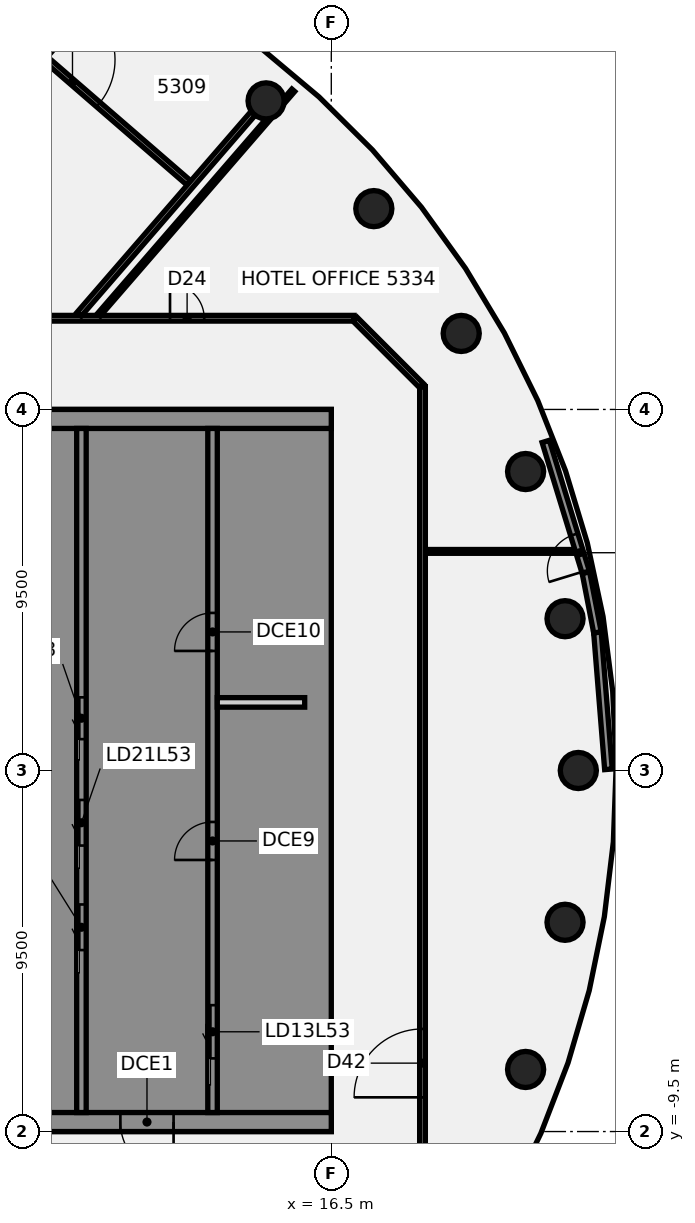
"""IFC4 building model, lengths in metres.
Left out: names, types, materials, properties, quantities, classifications, styles, units other than length and angle.
Written with IfcOpenShell. Run it as: python <this file> out.ifc"""

import sys

from ifc_helpers import new_model, si_unit, direction, frame, frame_2d, origin, origin_2d, place, context, subcontext, project, spatial, polyline, rectangle, circle, outline, extrude, element, fill, save


model = new_model("IFC4")
c1 = context("Model", 3, precision=1e-05, world=origin(), true_north=direction((0.0, 1.0)))
c2 = subcontext(c1, "Body", "Model", "MODEL_VIEW")
j1 = project(units=[si_unit("LENGTHUNIT", "METRE"), si_unit("PLANEANGLEUNIT", "RADIAN")], contexts=[c1])
p1 = place(None, origin())
s1 = spatial("IfcSite", under=j1, at=p1, CompositionType="ELEMENT")
p2 = place(p1, origin())
s2 = spatial("IfcBuilding", under=s1, at=p2, CompositionType="ELEMENT")
p3 = place(p2, frame((0.0, 0.0, 211.3)))
s3 = spatial("IfcBuildingStorey", under=s2, at=p3, CompositionType="ELEMENT", Elevation=211.3)
for number, where, z_axis, x_axis in (
    (1, (23.0, 0.0, -0.14), (0.0, 0.0, 1.0), (1.0, 0.0, 0.0)),
    (2, (22.651, 3.994, -0.14), (0.0, 0.0, 1.0), (1.0, 0.0, 0.0)),
    (3, (21.613, 7.866, -0.14), (0.0, 0.0, 1.0), (1.0, 0.0, 0.0)),
    (4, (19.919, 11.5, -0.14), (0.0, 0.0, 1.0), (1.0, 0.0, 0.0)),
    (5, (17.619, 14.784, -0.14), (0.0, 0.0, 1.0), (1.0, 0.0, 0.0)),
    (6, (14.784, 17.619, -0.14), (0.0, 0.0, 1.0), (1.0, 0.0, 0.0)),
    (7, (21.613, -7.866, -0.14), (0.0, 0.0, 1.0), (1.0, 0.0, 0.0)),
    (8, (22.651, -3.994, -0.14), (0.0, 0.0, 1.0), (1.0, 0.0, 0.0)),
):
    element("IfcColumn", number, at=place(p3, frame(where, z_axis=z_axis, x_axis=x_axis)), inside=s3, PredefinedType="COLUMN", context=c2, shape_type="SweptSolid", body=[
        extrude(circle(Radius=0.475, at=origin_2d()), origin(), (0.0, 0.0, 1.0), 3.56),
    ])
p4 = place(p3, frame((17.128, 11.872, 0.0), z_axis=(0.0, 0.0, 1.0), x_axis=(0.707106781187, -0.707106781187, 0.0)))
e9 = element("IfcWall", 9, at=p4, inside=s3, PredefinedType="PARTITIONING", context=c2, shape_type="SweptSolid", body=[
    extrude(rectangle(XDim=2.465, YDim=0.15, at=frame_2d((1.232, 0.0))), origin(), (0.0, 0.0, 1.0), 2.824),
])
p5 = place(p3, frame((4.362, 22.723, 0.0), z_axis=(0.0, 0.0, 1.0), x_axis=(0.756102728105, -0.654452950603, 0.0)))
e10 = element("IfcWall", 10, at=p5, inside=s3, PredefinedType="PARTITIONING", context=c2, shape_type="SweptSolid", body=[
    extrude(rectangle(XDim=11.096, YDim=0.15, at=frame_2d((5.548, 0.0))), origin(), (0.0, 0.0, 1.0), 2.824),
])
p6 = place(p5, frame((6.147, 0.0, 0.0)))
e11 = element("IfcOpeningElement", 11, at=p6, cuts=e10, PredefinedType="OPENING", context=c2, shape_type="SweptSolid", body=[
    extrude(rectangle(XDim=1.8, YDim=2.1, at=frame_2d((0.9, 1.05))), frame((0.0, 0.085, 0.0), z_axis=(0.0, -1.0, 0.0), x_axis=(1.0, 0.0, 0.0)), (0.0, 0.0, 1.0), 0.17),
])
p7 = place(p3, frame((-17.065, 11.9, 0.0), z_axis=(0.0, 0.0, 1.0), x_axis=(1.0, 0.0, 0.0)))
e12 = element("IfcWall", 12, at=p7, inside=s3, PredefinedType="PARTITIONING", context=c2, shape_type="SweptSolid", body=[
    extrude(rectangle(XDim=34.165, YDim=0.15, at=frame_2d((17.083, 0.0))), origin(), (0.0, 0.0, 1.0), 2.824),
])
p8 = place(p7, frame((24.284, 0.0, 0.0)))
e13 = element("IfcOpeningElement", 13, at=p8, cuts=e12, PredefinedType="OPENING", context=c2, shape_type="SweptSolid", body=[
    extrude(rectangle(XDim=1.8, YDim=2.1, at=frame_2d((0.9, 1.05))), frame((0.0, 0.085, 0.0), z_axis=(0.0, -1.0, 0.0), x_axis=(1.0, 0.0, 0.0)), (0.0, 0.0, 1.0), 0.17),
])
p9 = place(p7, frame((9.009, 0.0, 0.0)))
e14 = element("IfcOpeningElement", 14, at=p9, cuts=e12, PredefinedType="OPENING", context=c2, shape_type="SweptSolid", body=[
    extrude(rectangle(XDim=1.8, YDim=2.1, at=frame_2d((0.9, 1.05))), frame((0.0, 0.085, 0.0), z_axis=(0.0, -1.0, 0.0), x_axis=(1.0, 0.0, 0.0)), (0.0, 0.0, 1.0), 0.17),
])
p10 = place(p7, frame((29.321, 0.0, 0.0)))
e15 = element("IfcOpeningElement", 15, at=p10, cuts=e12, PredefinedType="OPENING", context=c2, shape_type="SweptSolid", body=[
    extrude(rectangle(XDim=0.9, YDim=2.1, at=frame_2d((0.45, 1.05))), frame((0.0, 0.085, 0.0), z_axis=(0.0, -1.0, 0.0), x_axis=(1.0, 0.0, 0.0)), (0.0, 0.0, 1.0), 0.17),
])
p11 = place(p7, frame((2.859, 0.0, 0.0)))
e16 = element("IfcOpeningElement", 16, at=p11, cuts=e12, PredefinedType="OPENING", context=c2, shape_type="SweptSolid", body=[
    extrude(rectangle(XDim=1.8, YDim=2.1, at=frame_2d((0.9, 1.05))), frame((0.0, 0.085, 0.0), z_axis=(0.0, -1.0, 0.0), x_axis=(1.0, 0.0, 0.0)), (0.0, 0.0, 1.0), 0.17),
])
p12 = place(p3, frame((18.955, 5.765, 0.0), z_axis=(0.0, 0.0, 1.0), x_axis=(1.0, 0.0, 0.0)))
e17 = element("IfcWall", 17, at=p12, inside=s3, PredefinedType="PARTITIONING", context=c2, shape_type="SweptSolid", body=[
    extrude(rectangle(XDim=4.022, YDim=0.1, at=frame_2d((2.011, 0.0))), origin(), (0.0, 0.0, 1.0), 2.824),
])
p13 = place(p3, frame((10.385, 11.991, 0.0), z_axis=(0.0, 0.0, 1.0), x_axis=(0.654631052214, 0.755948533617, 0.0)))
e18 = element("IfcWall", 18, at=p13, inside=s3, PredefinedType="PARTITIONING", context=c2, shape_type="SweptSolid", body=[
    extrude(rectangle(XDim=6.829, YDim=0.1, at=frame_2d((3.415, 0.0))), origin(), (0.0, 0.0, 1.0), 2.824),
])
p14 = place(p3, frame((15.267, 17.628, 0.0), z_axis=(0.0, 0.0, 1.0), x_axis=(0.655060689761, 0.75557626533, 0.0)))
e19 = element("IfcWall", 19, at=p14, inside=s3, PredefinedType="PARTITIONING", context=c2, shape_type="SweptSolid", body=[
    extrude(rectangle(XDim=0.357, YDim=0.1, at=frame_2d((0.178, 0.0))), origin(), (0.0, 0.0, 1.0), 2.824),
])
p15 = place(p3, frame((9.865, 12.006, 0.0), z_axis=(0.0, 0.0, 1.0), x_axis=(0.654719299236, 0.75587210506, 0.0)))
e20 = element("IfcWall", 20, at=p15, inside=s3, PredefinedType="PARTITIONING", context=c2, shape_type="SweptSolid", body=[
    extrude(rectangle(XDim=6.997, YDim=0.15, at=frame_2d((3.499, 0.0))), origin(), (0.0, 0.0, 1.0), 2.824),
])
p16 = place(p3, frame((18.9, -10.1, 0.0), z_axis=(0.0, 0.0, 1.0), x_axis=(0.0, 1.0, 0.0)))
e21 = element("IfcWall", 21, at=p16, inside=s3, PredefinedType="PARTITIONING", context=c2, shape_type="SweptSolid", body=[
    extrude(rectangle(XDim=20.2, YDim=0.15, at=frame_2d((10.1, 0.0))), origin(), (0.0, 0.0, 1.0), 2.824),
])
p17 = place(p16, frame((1.5, 0.0, 0.0)))
e22 = element("IfcOpeningElement", 22, at=p17, cuts=e21, PredefinedType="OPENING", context=c2, shape_type="SweptSolid", body=[
    extrude(rectangle(XDim=1.8, YDim=2.1, at=frame_2d((0.9, 1.05))), frame((0.0, 0.085, 0.0), z_axis=(0.0, -1.0, 0.0), x_axis=(1.0, 0.0, 0.0)), (0.0, 0.0, 1.0), 0.17),
])
p18 = place(p3, frame((23.793, 0.031, 0.0), z_axis=(0.0, 0.0, 1.0), x_axis=(-0.080027055539, 0.996792691778, 0.0)))
e23 = element("IfcWall", 23, at=p18, inside=s3, PredefinedType="SOLIDWALL", context=c2, shape_type="SweptSolid", body=[
    extrude(rectangle(XDim=3.615, YDim=0.2, at=frame_2d((1.808, 0.0))), origin(), (0.0, 0.0, 1.0), 3.42),
])
p19 = place(p3, frame((23.2, 5.204, 0.0), z_axis=(0.0, 0.0, 1.0), x_axis=(-0.292656271442, 0.956217708885, 0.0)))
e24 = element("IfcWall", 24, at=p19, inside=s3, PredefinedType="SOLIDWALL", context=c2, shape_type="SweptSolid", body=[
    extrude(rectangle(XDim=3.613, YDim=0.2, at=frame_2d((1.807, 0.0))), origin(), (0.0, 0.0, 1.0), 3.42),
])
p20 = place(p19, frame((0.05, 0.0, 0.0)))
e25 = element("IfcOpeningElement", 25, at=p20, cuts=e24, PredefinedType="OPENING", context=c2, shape_type="SweptSolid", body=[
    extrude(rectangle(XDim=1.0, YDim=2.4, at=frame_2d((0.5, 1.2))), frame((0.0, 0.11, 0.0), z_axis=(0.0, -1.0, 0.0), x_axis=(1.0, 0.0, 0.0)), (0.0, 0.0, 1.0), 0.22),
])
p21 = place(p3, frame((23.504, 3.634, 0.0), z_axis=(0.0, 0.0, 1.0), x_axis=(-0.189917473451, 0.981800057689, 0.0)))
e26 = element("IfcWall", 26, at=p21, inside=s3, PredefinedType="SOLIDWALL", context=c2, shape_type="SweptSolid", body=[
    extrude(rectangle(XDim=1.599, YDim=0.2, at=frame_2d((0.8, 0.0))), origin(), (0.0, 0.0, 1.0), 3.42),
])
p22 = place(p3, frame((16.5, -9.25, 0.0), z_axis=(0.0, 0.0, 1.0), x_axis=(-1.0, 0.0, 0.0)))
e27 = element("IfcWall", 27, at=p22, inside=s3, PredefinedType="SHEAR", context=c2, shape_type="SweptSolid", body=[
    extrude(rectangle(XDim=13.0, YDim=0.5, at=frame_2d((6.5, 0.0))), origin(), (0.0, 0.0, 1.0), 3.42),
])
p23 = place(p22, frame((4.15, 0.0, 0.0)))
e28 = element("IfcOpeningElement", 28, at=p23, cuts=e27, PredefinedType="OPENING", context=c2, shape_type="SweptSolid", body=[
    extrude(rectangle(XDim=1.4, YDim=2.1, at=frame_2d((0.7, 1.05))), frame((0.0, 0.26, 0.0), z_axis=(0.0, -1.0, 0.0), x_axis=(1.0, 0.0, 0.0)), (0.0, 0.0, 1.0), 0.52),
])
p24 = place(p22, frame((10.125, 0.0, 0.0)))
e29 = element("IfcOpeningElement", 29, at=p24, cuts=e27, PredefinedType="OPENING", context=c2, shape_type="SweptSolid", body=[
    extrude(rectangle(XDim=1.4, YDim=2.1, at=frame_2d((0.7, 1.05))), frame((0.0, 0.26, 0.0), z_axis=(0.0, -1.0, 0.0), x_axis=(1.0, 0.0, 0.0)), (0.0, 0.0, 1.0), 0.52),
])
p25 = place(p3, origin())
e30 = element("IfcWall", 30, at=p25, inside=s3, PredefinedType="SHEAR", context=c2, shape_type="SweptSolid", body=[
    extrude(outline(polyline([(13.5, -8.125), (13.5, -9.0), (16.0, -9.0), (16.5, -9.0), (16.5, 9.0), (16.0, 9.0), (13.5, 9.0), (13.5, 8.125), (16.0, 8.125), (16.0, 5.625), (13.5, 5.625), (13.5, 5.375), (16.0, 5.375), (16.0, -5.375), (13.5, -5.375), (13.5, -5.625), (16.0, -5.625), (16.0, -8.125), (13.5, -8.125)])), origin(), (0.0, 0.0, 1.0), 3.42),
])
p26 = place(p3, frame((16.5, 9.25, 0.0), z_axis=(0.0, 0.0, 1.0), x_axis=(-1.0, 0.0, 0.0)))
e31 = element("IfcWall", 31, at=p26, inside=s3, PredefinedType="SHEAR", context=c2, shape_type="SweptSolid", body=[
    extrude(rectangle(XDim=13.0, YDim=0.5, at=frame_2d((6.5, 0.0))), origin(), (0.0, 0.0, 1.0), 3.42),
])
p27 = place(p3, origin())
e32 = element("IfcWall", 32, at=p27, inside=s3, PredefinedType="SHEAR", context=c2, shape_type="SweptSolid", body=[
    extrude(outline(polyline([(9.8, -5.375), (7.5, -5.375), (7.5, -2.875), (9.8, -2.875), (9.8, -2.625), (7.5, -2.625), (7.5, -0.125), (9.8, -0.125), (9.8, 0.125), (7.5, 0.125), (7.5, 2.625), (9.8, 2.625), (9.8, 2.875), (7.5, 2.875), (7.5, 5.375), (9.8, 5.375), (9.8, 5.625), (7.5, 5.625), (7.5, 8.125), (9.8, 8.125), (9.8, 9.0), (7.5, 9.0), (7.25, 9.0), (7.25, -5.625), (7.5, -5.625), (9.8, -5.625), (9.8, -5.375)])), origin(), (0.0, 0.0, 1.0), 3.42),
])
p28 = place(p3, origin())
e33 = element("IfcWall", 33, at=p28, inside=s3, PredefinedType="SHEAR", context=c2, shape_type="SweptSolid", body=[
    extrude(outline(polyline([(7.5, -8.125), (7.5, -9.0), (9.8, -9.0), (9.8, -8.125), (9.8, -5.625), (9.55, -5.625), (9.55, -8.125), (7.5, -8.125)])), origin(), (0.0, 0.0, 1.0), 3.42),
])
p29 = place(p3, frame((13.375, -9.0, 0.0), z_axis=(0.0, 0.0, 1.0), x_axis=(0.0, 1.0, 0.0)))
e34 = element("IfcWall", 34, at=p29, inside=s3, PredefinedType="SHEAR", context=c2, shape_type="SweptSolid", body=[
    extrude(rectangle(XDim=18.0, YDim=0.25, at=frame_2d((9.0, 0.0))), origin(), (0.0, 0.0, 1.0), 3.42),
])
p30 = place(p29, frame((1.425, 0.0, 0.0)))
e35 = element("IfcOpeningElement", 35, at=p30, cuts=e34, PredefinedType="OPENING", context=c2, shape_type="SweptSolid", body=[
    extrude(rectangle(XDim=1.4, YDim=2.1, at=frame_2d((0.7, 1.05))), frame((0.0, 0.135, 0.0), z_axis=(0.0, -1.0, 0.0), x_axis=(1.0, 0.0, 0.0)), (0.0, 0.0, 1.0), 0.27),
])
p31 = place(p29, frame((6.646, 0.0, 0.0)))
e36 = element("IfcOpeningElement", 36, at=p31, cuts=e34, PredefinedType="OPENING", context=c2, shape_type="SweptSolid", body=[
    extrude(rectangle(XDim=1.0, YDim=2.1, at=frame_2d((0.5, 1.05))), frame((0.0, 0.135, 0.0), z_axis=(0.0, -1.0, 0.0), x_axis=(1.0, 0.0, 0.0)), (0.0, 0.0, 1.0), 0.27),
])
p32 = place(p29, frame((12.146, 0.0, 0.0)))
e37 = element("IfcOpeningElement", 37, at=p32, cuts=e34, PredefinedType="OPENING", context=c2, shape_type="SweptSolid", body=[
    extrude(rectangle(XDim=1.0, YDim=2.1, at=frame_2d((0.5, 1.05))), frame((0.0, 0.135, 0.0), z_axis=(0.0, -1.0, 0.0), x_axis=(1.0, 0.0, 0.0)), (0.0, 0.0, 1.0), 0.27),
])
p33 = place(p3, frame((9.925, -9.0, 0.0), z_axis=(0.0, 0.0, 1.0), x_axis=(0.0, 1.0, 0.0)))
e38 = element("IfcWall", 38, at=p33, inside=s3, PredefinedType="SHEAR", context=c2, shape_type="SweptSolid", body=[
    extrude(rectangle(XDim=18.0, YDim=0.25, at=frame_2d((9.0, 0.0))), origin(), (0.0, 0.0, 1.0), 3.42),
])
p34 = place(p33, frame((4.275, 0.0, 0.0)))
e39 = element("IfcOpeningElement", 39, at=p34, cuts=e38, PredefinedType="OPENING", context=c2, shape_type="SweptSolid", body=[
    extrude(rectangle(XDim=1.2, YDim=2.1, at=frame_2d((0.6, 1.05))), frame((0.0, 0.135, 0.0), z_axis=(0.0, -1.0, 0.0), x_axis=(1.0, 0.0, 0.0)), (0.0, 0.0, 1.0), 0.27),
])
p35 = place(p33, frame((7.025, 0.0, 0.0)))
e40 = element("IfcOpeningElement", 40, at=p35, cuts=e38, PredefinedType="OPENING", context=c2, shape_type="SweptSolid", body=[
    extrude(rectangle(XDim=1.2, YDim=2.1, at=frame_2d((0.6, 1.05))), frame((0.0, 0.135, 0.0), z_axis=(0.0, -1.0, 0.0), x_axis=(1.0, 0.0, 0.0)), (0.0, 0.0, 1.0), 0.27),
])
p36 = place(p33, frame((9.825, 0.0, 0.0)))
e41 = element("IfcOpeningElement", 41, at=p36, cuts=e38, PredefinedType="OPENING", context=c2, shape_type="SweptSolid", body=[
    extrude(rectangle(XDim=1.1, YDim=2.1, at=frame_2d((0.55, 1.05))), frame((0.0, 0.135, 0.0), z_axis=(0.0, -1.0, 0.0), x_axis=(1.0, 0.0, 0.0)), (0.0, 0.0, 1.0), 0.27),
])
p37 = place(p3, frame((15.8, 1.792, 0.0), z_axis=(0.0, 0.0, 1.0), x_axis=(-1.0, 0.0, 0.0)))
e42 = element("IfcWall", 42, at=p37, inside=s3, PredefinedType="PARTITIONING", context=c2, shape_type="SweptSolid", body=[
    extrude(rectangle(XDim=2.3, YDim=0.25, at=frame_2d((1.15, 0.0))), origin(), (0.0, 0.0, 1.0), 3.42),
])
p38 = place(p6, origin())
e43 = element("IfcDoor", 43, at=p38, inside=s3, OperationType="DOUBLE_DOOR_SINGLE_SWING", PredefinedType="DOOR", context=c2, shape_type="SweptSolid", body=[
    extrude(rectangle(XDim=1.8, YDim=2.1, at=frame_2d((0.9, 1.05))), frame((0.0, 0.025, 0.0), z_axis=(0.0, -1.0, 0.0), x_axis=(1.0, 0.0, 0.0)), (0.0, 0.0, 1.0), 0.05),
])
fill(e11, e43)
p39 = place(p10, origin())
e44 = element("IfcDoor", 44, at=p39, inside=s3, OperationType="SINGLE_SWING_LEFT", PredefinedType="DOOR", context=c2, shape_type="SweptSolid", body=[
    extrude(rectangle(XDim=0.9, YDim=2.1, at=frame_2d((0.45, 1.05))), frame((0.0, 0.025, 0.0), z_axis=(0.0, -1.0, 0.0), x_axis=(1.0, 0.0, 0.0)), (0.0, 0.0, 1.0), 0.05),
])
fill(e15, e44)
p40 = place(p17, origin())
e45 = element("IfcDoor", 45, at=p40, inside=s3, OperationType="DOUBLE_DOOR_SINGLE_SWING", PredefinedType="DOOR", context=c2, shape_type="SweptSolid", body=[
    extrude(rectangle(XDim=1.8, YDim=2.1, at=frame_2d((0.9, 1.05))), frame((0.0, 0.025, 0.0), z_axis=(0.0, -1.0, 0.0), x_axis=(1.0, 0.0, 0.0)), (0.0, 0.0, 1.0), 0.05),
])
fill(e22, e45)
p41 = place(p20, origin())
e46 = element("IfcDoor", 46, at=p41, inside=s3, OperationType="SINGLE_SWING_LEFT", PredefinedType="DOOR", context=c2, shape_type="SweptSolid", body=[
    extrude(rectangle(XDim=1.0, YDim=2.4, at=frame_2d((0.5, 1.2))), frame((0.0, 0.025, 0.0), z_axis=(0.0, -1.0, 0.0), x_axis=(1.0, 0.0, 0.0)), (0.0, 0.0, 1.0), 0.05),
])
fill(e25, e46)
p42 = place(p23, origin())
e47 = element("IfcDoor", 47, at=p42, inside=s3, OperationType="SINGLE_SWING_LEFT", PredefinedType="DOOR", context=c2, shape_type="SweptSolid", body=[
    extrude(rectangle(XDim=1.4, YDim=2.1, at=frame_2d((0.7, 1.05))), frame((0.0, 0.025, 0.0), z_axis=(0.0, -1.0, 0.0), x_axis=(1.0, 0.0, 0.0)), (0.0, 0.0, 1.0), 0.05),
])
fill(e28, e47)
p43 = place(p30, origin())
e48 = element("IfcDoor", 48, at=p43, inside=s3, OperationType="SLIDING_TO_LEFT", PredefinedType="DOOR", context=c2, shape_type="SweptSolid", body=[
    extrude(rectangle(XDim=1.4, YDim=2.1, at=frame_2d((0.7, 1.05))), frame((0.0, 0.025, 0.0), z_axis=(0.0, -1.0, 0.0), x_axis=(1.0, 0.0, 0.0)), (0.0, 0.0, 1.0), 0.05),
])
fill(e35, e48)
p44 = place(p34, origin())
e49 = element("IfcDoor", 49, at=p44, inside=s3, OperationType="SLIDING_TO_LEFT", PredefinedType="DOOR", context=c2, shape_type="SweptSolid", body=[
    extrude(rectangle(XDim=1.2, YDim=2.1, at=frame_2d((0.6, 1.05))), frame((0.0, 0.025, 0.0), z_axis=(0.0, -1.0, 0.0), x_axis=(1.0, 0.0, 0.0)), (0.0, 0.0, 1.0), 0.05),
])
fill(e39, e49)
p45 = place(p35, origin())
e50 = element("IfcDoor", 50, at=p45, inside=s3, OperationType="SLIDING_TO_LEFT", PredefinedType="DOOR", context=c2, shape_type="SweptSolid", body=[
    extrude(rectangle(XDim=1.2, YDim=2.1, at=frame_2d((0.6, 1.05))), frame((0.0, 0.025, 0.0), z_axis=(0.0, -1.0, 0.0), x_axis=(1.0, 0.0, 0.0)), (0.0, 0.0, 1.0), 0.05),
])
fill(e40, e50)
p46 = place(p36, origin())
e51 = element("IfcDoor", 51, at=p46, inside=s3, OperationType="SLIDING_TO_LEFT", PredefinedType="DOOR", context=c2, shape_type="SweptSolid", body=[
    extrude(rectangle(XDim=1.1, YDim=2.1, at=frame_2d((0.55, 1.05))), frame((0.0, 0.025, 0.0), z_axis=(0.0, -1.0, 0.0), x_axis=(1.0, 0.0, 0.0)), (0.0, 0.0, 1.0), 0.05),
])
fill(e41, e51)
p47 = place(p31, origin())
e52 = element("IfcDoor", 52, at=p47, inside=s3, OperationType="SINGLE_SWING_LEFT", PredefinedType="DOOR", context=c2, shape_type="SweptSolid", body=[
    extrude(rectangle(XDim=1.0, YDim=2.1, at=frame_2d((0.5, 1.05))), frame((0.0, 0.025, 0.0), z_axis=(0.0, -1.0, 0.0), x_axis=(1.0, 0.0, 0.0)), (0.0, 0.0, 1.0), 0.05),
])
fill(e36, e52)
p48 = place(p32, origin())
e53 = element("IfcDoor", 53, at=p48, inside=s3, OperationType="SINGLE_SWING_LEFT", PredefinedType="DOOR", context=c2, shape_type="SweptSolid", body=[
    extrude(rectangle(XDim=1.0, YDim=2.1, at=frame_2d((0.5, 1.05))), frame((0.0, 0.025, 0.0), z_axis=(0.0, -1.0, 0.0), x_axis=(1.0, 0.0, 0.0)), (0.0, 0.0, 1.0), 0.05),
])
fill(e37, e53)
save(model, sys.argv[1])
